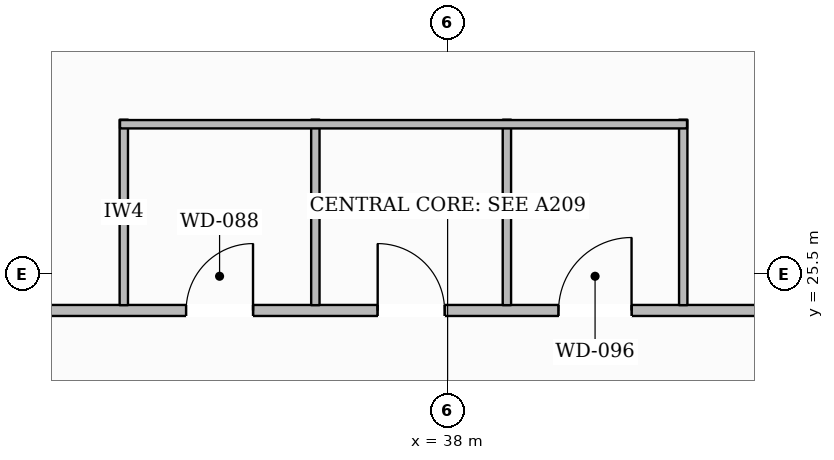
"""IFC4 building model, lengths in metres.
Left out: names, types, materials, properties, quantities, classifications, styles, units other than length and angle.
Written with IfcOpenShell. Run it as: python <this file> out.ifc"""

import sys

from ifc_helpers import new_model, si_unit, direction, frame, frame_2d, origin, place, context, subcontext, project, spatial, rectangle, extrude, element, fill, save


model = new_model("IFC4")
c1 = context("Model", 3, precision=1e-05, world=origin(), true_north=direction((0.0, 1.0)))
c2 = subcontext(c1, "Body", "Model", "MODEL_VIEW")
j1 = project(units=[si_unit("LENGTHUNIT", "METRE"), si_unit("PLANEANGLEUNIT", "RADIAN")], contexts=[c1])
p1 = place(None, origin())
s1 = spatial("IfcSite", under=j1, at=p1, CompositionType="ELEMENT")
p2 = place(p1, origin())
s2 = spatial("IfcBuilding", under=s1, at=p2, CompositionType="ELEMENT")
p3 = place(p2, frame((0.0, 0.0, 172.7)))
s3 = spatial("IfcBuildingStorey", under=s2, at=p3, CompositionType="ELEMENT", Elevation=172.7)
p4 = place(p3, frame((15.132, 12.224, 0.0), z_axis=(0.0, 0.0, 1.0), x_axis=(0.492438100446, 0.870347469249, 0.0)))
e1 = element("IfcWall", 1, at=p4, inside=s3, PredefinedType="STANDARD", context=c2, shape_type="SweptSolid", body=[
    extrude(rectangle(XDim=37.194, YDim=0.35, at=frame_2d((18.597, 0.0))), origin(), (0.0, 0.0, 1.0), 3.132),
])
p5 = place(p4, frame((32.967, 0.0, 0.65)))
e2 = element("IfcOpeningElement", 2, at=p5, cuts=e1, PredefinedType="OPENING", context=c2, shape_type="SweptSolid", body=[
    extrude(rectangle(XDim=1.45, YDim=1.75, at=frame_2d((0.725, 0.875))), frame((0.0, 0.185, 0.0), z_axis=(0.0, -1.0, 0.0), x_axis=(1.0, 0.0, 0.0)), (0.0, 0.0, 1.0), 0.37),
])
p6 = place(p4, frame((26.927, 0.0, 0.65)))
e3 = element("IfcOpeningElement", 3, at=p6, cuts=e1, PredefinedType="OPENING", context=c2, shape_type="SweptSolid", body=[
    extrude(rectangle(XDim=1.45, YDim=1.75, at=frame_2d((0.725, 0.875))), frame((0.0, 0.185, 0.0), z_axis=(0.0, -1.0, 0.0), x_axis=(1.0, 0.0, 0.0)), (0.0, 0.0, 1.0), 0.37),
])
p7 = place(p4, frame((14.848, 0.0, 0.65)))
e4 = element("IfcOpeningElement", 4, at=p7, cuts=e1, PredefinedType="OPENING", context=c2, shape_type="SweptSolid", body=[
    extrude(rectangle(XDim=1.45, YDim=1.75, at=frame_2d((0.725, 0.875))), frame((0.0, 0.185, 0.0), z_axis=(0.0, -1.0, 0.0), x_axis=(1.0, 0.0, 0.0)), (0.0, 0.0, 1.0), 0.37),
])
p8 = place(p4, frame((8.808, 0.0, 0.65)))
e5 = element("IfcOpeningElement", 5, at=p8, cuts=e1, PredefinedType="OPENING", context=c2, shape_type="SweptSolid", body=[
    extrude(rectangle(XDim=1.45, YDim=1.75, at=frame_2d((0.725, 0.875))), frame((0.0, 0.185, 0.0), z_axis=(0.0, -1.0, 0.0), x_axis=(1.0, 0.0, 0.0)), (0.0, 0.0, 1.0), 0.37),
])
p9 = place(p4, frame((2.769, 0.0, 0.65)))
e6 = element("IfcOpeningElement", 6, at=p9, cuts=e1, PredefinedType="OPENING", context=c2, shape_type="SweptSolid", body=[
    extrude(rectangle(XDim=1.45, YDim=1.75, at=frame_2d((0.725, 0.875))), frame((0.0, 0.185, 0.0), z_axis=(0.0, -1.0, 0.0), x_axis=(1.0, 0.0, 0.0)), (0.0, 0.0, 1.0), 0.37),
])
p10 = place(p3, frame((31.0, 25.02, 0.0), z_axis=(0.0, 0.0, 1.0), x_axis=(1.0, 0.0, 0.0)))
e7 = element("IfcWall", 7, at=p10, inside=s3, PredefinedType="PARTITIONING", context=c2, shape_type="SweptSolid", body=[
    extrude(rectangle(XDim=14.0, YDim=0.145, at=frame_2d((7.0, 0.0))), origin(), (0.0, 0.0, 1.0), 3.6),
])
p11 = place(p10, frame((3.56, 0.0, 0.0)))
e8 = element("IfcOpeningElement", 8, at=p11, cuts=e7, PredefinedType="OPENING", context=c2, shape_type="SweptSolid", body=[
    extrude(rectangle(XDim=0.88, YDim=2.1, at=frame_2d((0.44, 1.05))), frame((0.0, 0.083, 0.0), z_axis=(0.0, -1.0, 0.0), x_axis=(1.0, 0.0, 0.0)), (0.0, 0.0, 1.0), 0.165),
])
p12 = place(p10, frame((6.08, 0.0, 0.0)))
e9 = element("IfcOpeningElement", 9, at=p12, cuts=e7, PredefinedType="OPENING", context=c2, shape_type="SweptSolid", body=[
    extrude(rectangle(XDim=0.88, YDim=2.1, at=frame_2d((0.44, 1.05))), frame((0.0, 0.083, 0.0), z_axis=(0.0, -1.0, 0.0), x_axis=(1.0, 0.0, 0.0)), (0.0, 0.0, 1.0), 0.165),
])
p13 = place(p10, frame((8.46, 0.0, 0.0)))
e10 = element("IfcOpeningElement", 10, at=p13, cuts=e7, PredefinedType="OPENING", context=c2, shape_type="SweptSolid", body=[
    extrude(rectangle(XDim=0.96, YDim=2.1, at=frame_2d((0.48, 1.05))), frame((0.0, 0.083, 0.0), z_axis=(0.0, -1.0, 0.0), x_axis=(1.0, 0.0, 0.0)), (0.0, 0.0, 1.0), 0.165),
])
for number, where, z_axis, x_axis in (
    (11, (33.74, 25.09, 0.0), (0.0, 0.0, 1.0), (0.0, 1.0, 0.0)),
    (12, (36.26, 25.09, 0.0), (0.0, 0.0, 1.0), (0.0, 1.0, 0.0)),
    (13, (38.78, 25.09, 0.0), (0.0, 0.0, 1.0), (0.0, 1.0, 0.0)),
    (14, (41.1, 25.09, 0.0), (0.0, 0.0, 1.0), (0.0, 1.0, 0.0)),
):
    element("IfcWall", number, at=place(p3, frame(where, z_axis=z_axis, x_axis=x_axis)), inside=s3, PredefinedType="PLUMBINGWALL", context=c2, shape_type="SweptSolid", body=[
        extrude(rectangle(XDim=2.44, YDim=0.11, at=frame_2d((1.22, 0.0))), origin(), (0.0, 0.0, 1.0), 3.6),
    ])
p14 = place(p3, frame((33.69, 27.47, 0.0), z_axis=(0.0, 0.0, 1.0), x_axis=(1.0, 0.0, 0.0)))
e15 = element("IfcWall", 15, at=p14, inside=s3, PredefinedType="PLUMBINGWALL", context=c2, shape_type="SweptSolid", body=[
    extrude(rectangle(XDim=7.46, YDim=0.11, at=frame_2d((3.73, 0.0))), origin(), (0.0, 0.0, 1.0), 3.6),
])
p15 = place(p11, origin())
e16 = element("IfcDoor", 16, at=p15, inside=s3, OperationType="SINGLE_SWING_RIGHT", PredefinedType="DOOR", context=c2, shape_type="SweptSolid", body=[
    extrude(rectangle(XDim=0.88, YDim=2.1, at=frame_2d((0.44, 1.05))), frame((0.0, 0.025, 0.0), z_axis=(0.0, -1.0, 0.0), x_axis=(1.0, 0.0, 0.0)), (0.0, 0.0, 1.0), 0.05),
])
fill(e8, e16)
p16 = place(p12, origin())
e17 = element("IfcDoor", 17, at=p16, inside=s3, OperationType="SINGLE_SWING_LEFT", PredefinedType="DOOR", context=c2, shape_type="SweptSolid", body=[
    extrude(rectangle(XDim=0.88, YDim=2.1, at=frame_2d((0.44, 1.05))), frame((0.0, 0.025, 0.0), z_axis=(0.0, -1.0, 0.0), x_axis=(1.0, 0.0, 0.0)), (0.0, 0.0, 1.0), 0.05),
])
fill(e9, e17)
p17 = place(p13, origin())
e18 = element("IfcDoor", 18, at=p17, inside=s3, OperationType="SINGLE_SWING_RIGHT", PredefinedType="DOOR", context=c2, shape_type="SweptSolid", body=[
    extrude(rectangle(XDim=0.96, YDim=2.1, at=frame_2d((0.48, 1.05))), frame((0.0, 0.025, 0.0), z_axis=(0.0, -1.0, 0.0), x_axis=(1.0, 0.0, 0.0)), (0.0, 0.0, 1.0), 0.05),
])
fill(e10, e18)
save(model, sys.argv[1])
